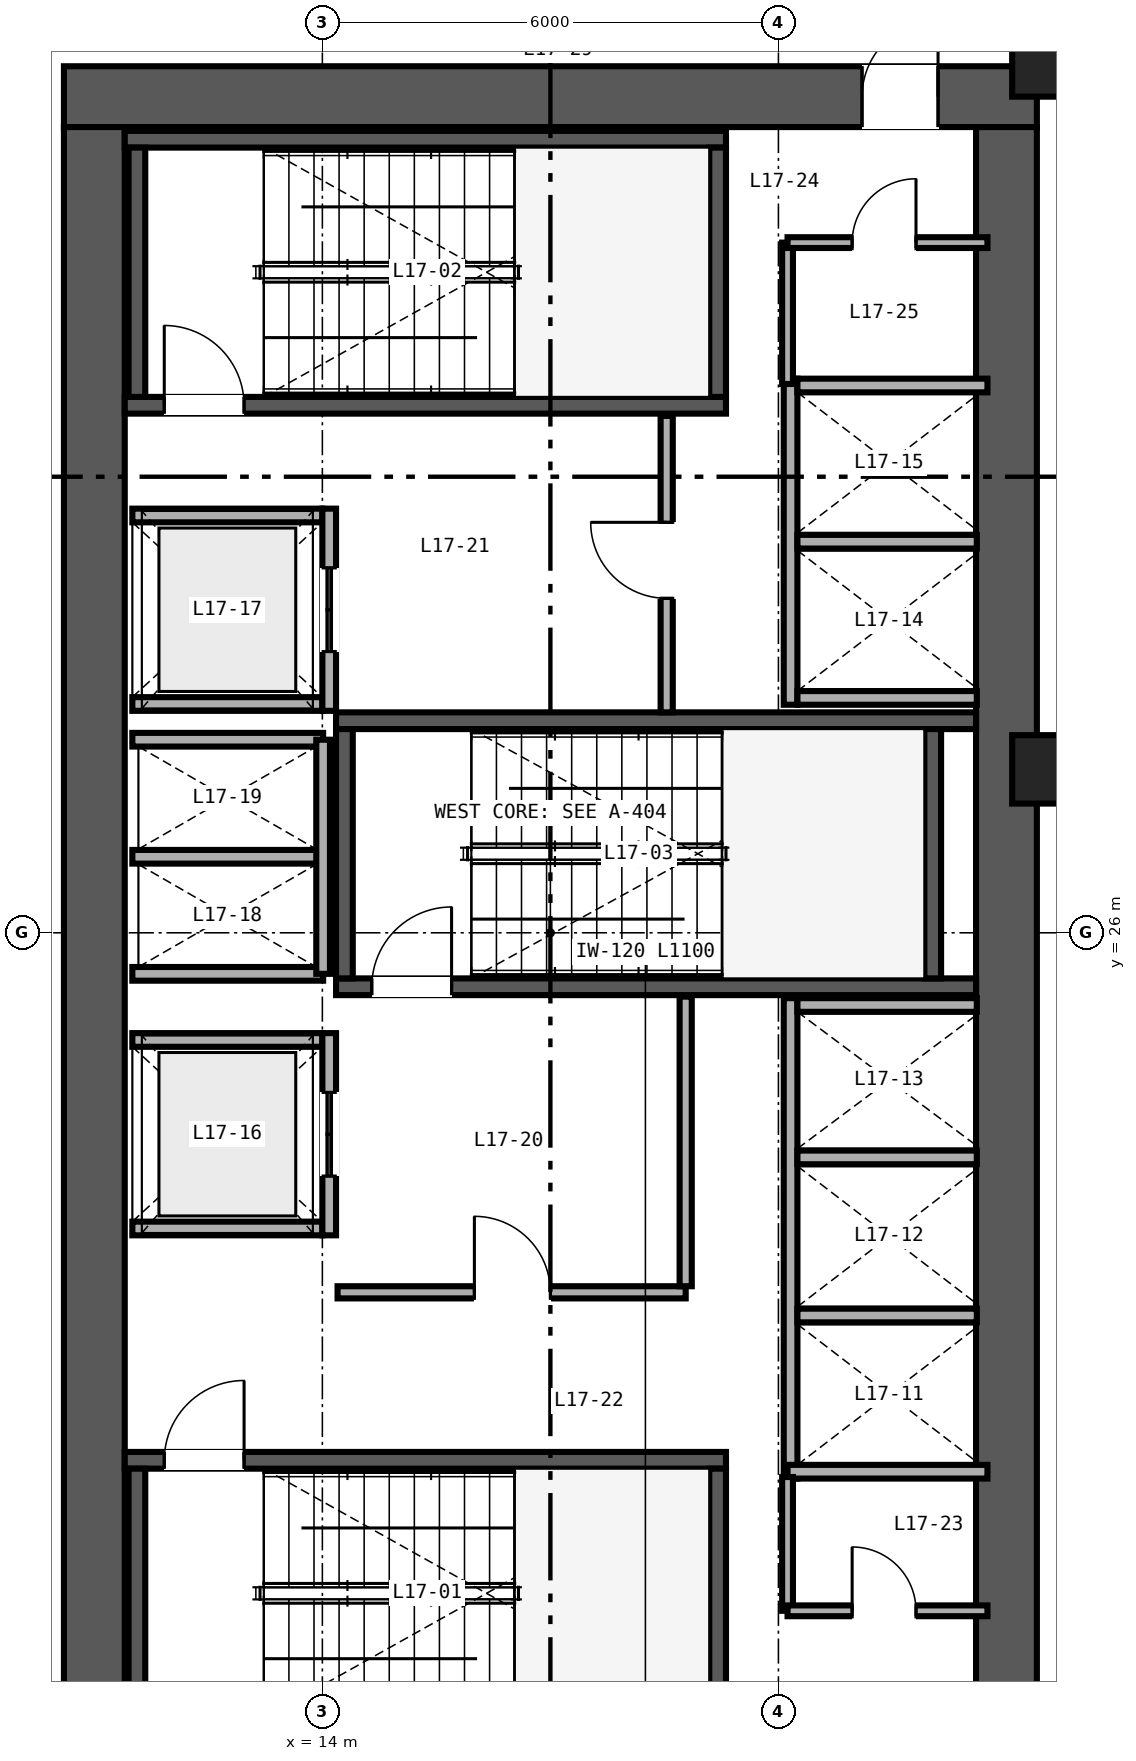
"""IFC4 building model, lengths in metres.
Left out: names, types, materials, properties, quantities, classifications, styles, units other than length and angle.
Written with IfcOpenShell. Run it as: python <this file> out.ifc"""

import sys

from ifc_helpers import new_model, si_unit, direction, frame, frame_2d, origin, origin_2d, place, context, subcontext, project, spatial, rectangle, hollow_rectangle, extrude, source, transform, mapped, element, fill, save


model = new_model("IFC4")
c1 = context("Model", 3, precision=1e-05, world=origin(), true_north=direction((0.0, 1.0)))
c2 = subcontext(c1, "Body", "Model", "MODEL_VIEW")
j1 = project(units=[si_unit("LENGTHUNIT", "METRE"), si_unit("PLANEANGLEUNIT", "RADIAN")], contexts=[c1])
p1 = place(None, origin())
s1 = spatial("IfcSite", under=j1, at=p1, CompositionType="ELEMENT")
p2 = place(p1, origin())
s2 = spatial("IfcBuilding", under=s1, at=p2, CompositionType="ELEMENT")
p3 = place(p2, frame((0.0, 0.0, 70.8)))
s3 = spatial("IfcBuildingStorey", under=s2, at=p3, CompositionType="ELEMENT", Elevation=70.8)
p4 = place(p3, frame((10.6, 37.0, 0.0), z_axis=(0.0, 0.0, 1.0), x_axis=(1.0, 0.0, 0.0)))
e1 = element("IfcWall", 1, at=p4, inside=s3, PredefinedType="SHEAR", context=c2, shape_type="SweptSolid", body=[
    extrude(rectangle(XDim=12.8, YDim=0.8, at=frame_2d((6.4, 0.0))), origin(), (0.0, 0.0, 1.0), 3.35),
])
p5 = place(p4, frame((10.5, 0.0, 0.0)))
e2 = element("IfcOpeningElement", 2, at=p5, cuts=e1, PredefinedType="OPENING", context=c2, shape_type="SweptSolid", body=[
    extrude(rectangle(XDim=1.0, YDim=2.15, at=frame_2d((0.5, 1.075))), frame((0.0, 0.41, 0.0), z_axis=(0.0, -1.0, 0.0), x_axis=(1.0, 0.0, 0.0)), (0.0, 0.0, 1.0), 0.82),
])
for number, where, z_axis, x_axis in (
    (3, (11.0, 15.4, 0.0), (0.0, 0.0, 1.0), (0.0, 1.0, 0.0)),
    (4, (23.0, 15.4, 0.0), (0.0, 0.0, 1.0), (0.0, 1.0, 0.0)),
):
    element("IfcWall", number, at=place(p3, frame(where, z_axis=z_axis, x_axis=x_axis)), inside=s3, PredefinedType="SHEAR", context=c2, shape_type="SweptSolid", body=[
        extrude(rectangle(XDim=21.2, YDim=0.8, at=frame_2d((10.6, 0.0))), origin(), (0.0, 0.0, 1.0), 3.35),
    ])
p6 = place(p3, frame((11.4, 19.06, 0.0), z_axis=(0.0, 0.0, 1.0), x_axis=(1.0, 0.0, 0.0)))
e5 = element("IfcWall", 5, at=p6, inside=s3, PredefinedType="SHEAR", context=c2, shape_type="SweptSolid", body=[
    extrude(rectangle(XDim=7.91, YDim=0.22, at=frame_2d((3.955, 0.0))), origin(), (0.0, 0.0, 1.0), 3.4),
])
p7 = place(p6, frame((0.52, 0.0, 0.0)))
e6 = element("IfcOpeningElement", 6, at=p7, cuts=e5, PredefinedType="OPENING", context=c2, shape_type="SweptSolid", body=[
    extrude(rectangle(XDim=1.05, YDim=2.15, at=frame_2d((0.525, 1.075))), frame((0.0, 0.12, 0.0), z_axis=(0.0, -1.0, 0.0), x_axis=(1.0, 0.0, 0.0)), (0.0, 0.0, 1.0), 0.24),
])
for number, where, z_axis, x_axis in (
    (7, (11.56, 15.67, 0.0), (0.0, 0.0, 1.0), (0.0, 1.0, 0.0)),
    (8, (19.2, 15.67, 0.0), (0.0, 0.0, 1.0), (0.0, 1.0, 0.0)),
):
    element("IfcWall", number, at=place(p3, frame(where, z_axis=z_axis, x_axis=x_axis)), inside=s3, PredefinedType="SHEAR", context=c2, shape_type="SweptSolid", body=[
        extrude(rectangle(XDim=3.28, YDim=0.22, at=frame_2d((1.64, 0.0))), origin(), (0.0, 0.0, 1.0), 3.4),
    ])
p8 = place(p3, frame((11.4, 32.94, 0.0), z_axis=(0.0, 0.0, 1.0), x_axis=(1.0, 0.0, 0.0)))
e9 = element("IfcWall", 9, at=p8, inside=s3, PredefinedType="SHEAR", context=c2, shape_type="SweptSolid", body=[
    extrude(rectangle(XDim=7.91, YDim=0.22, at=frame_2d((3.955, 0.0))), origin(), (0.0, 0.0, 1.0), 3.4),
])
p9 = place(p8, frame((0.52, 0.0, 0.0)))
e10 = element("IfcOpeningElement", 10, at=p9, cuts=e9, PredefinedType="OPENING", context=c2, shape_type="SweptSolid", body=[
    extrude(rectangle(XDim=1.05, YDim=2.15, at=frame_2d((0.525, 1.075))), frame((0.0, 0.12, 0.0), z_axis=(0.0, -1.0, 0.0), x_axis=(1.0, 0.0, 0.0)), (0.0, 0.0, 1.0), 0.24),
])
p10 = place(p3, frame((11.4, 36.44, 0.0), z_axis=(0.0, 0.0, 1.0), x_axis=(1.0, 0.0, 0.0)))
e11 = element("IfcWall", 11, at=p10, inside=s3, PredefinedType="SHEAR", context=c2, shape_type="SweptSolid", body=[
    extrude(rectangle(XDim=7.91, YDim=0.22, at=frame_2d((3.955, 0.0))), origin(), (0.0, 0.0, 1.0), 3.4),
])
for number, where, z_axis, x_axis in (
    (12, (11.56, 33.05, 0.0), (0.0, 0.0, 1.0), (0.0, 1.0, 0.0)),
    (13, (19.2, 33.05, 0.0), (0.0, 0.0, 1.0), (0.0, 1.0, 0.0)),
):
    element("IfcWall", number, at=place(p3, frame(where, z_axis=z_axis, x_axis=x_axis)), inside=s3, PredefinedType="SHEAR", context=c2, shape_type="SweptSolid", body=[
        extrude(rectangle(XDim=3.28, YDim=0.22, at=frame_2d((1.64, 0.0))), origin(), (0.0, 0.0, 1.0), 3.4),
    ])
p11 = place(p3, frame((14.18, 25.29, 0.0), z_axis=(0.0, 0.0, 1.0), x_axis=(1.0, 0.0, 0.0)))
e14 = element("IfcWall", 14, at=p11, inside=s3, PredefinedType="SHEAR", context=c2, shape_type="SweptSolid", body=[
    extrude(rectangle(XDim=8.42, YDim=0.22, at=frame_2d((4.21, 0.0))), origin(), (0.0, 0.0, 1.0), 3.4),
])
p12 = place(p11, frame((0.47, 0.0, 0.0)))
e15 = element("IfcOpeningElement", 15, at=p12, cuts=e14, PredefinedType="OPENING", context=c2, shape_type="SweptSolid", body=[
    extrude(rectangle(XDim=1.05, YDim=2.15, at=frame_2d((0.525, 1.075))), frame((0.0, 0.12, 0.0), z_axis=(0.0, -1.0, 0.0), x_axis=(1.0, 0.0, 0.0)), (0.0, 0.0, 1.0), 0.24),
])
p13 = place(p3, frame((14.18, 28.79, 0.0), z_axis=(0.0, 0.0, 1.0), x_axis=(1.0, 0.0, 0.0)))
e16 = element("IfcWall", 16, at=p13, inside=s3, PredefinedType="SHEAR", context=c2, shape_type="SweptSolid", body=[
    extrude(rectangle(XDim=8.42, YDim=0.22, at=frame_2d((4.21, 0.0))), origin(), (0.0, 0.0, 1.0), 3.4),
])
for number, where, z_axis, x_axis in (
    (17, (14.29, 25.4, 0.0), (0.0, 0.0, 1.0), (0.0, 1.0, 0.0)),
    (18, (22.03, 25.4, 0.0), (0.0, 0.0, 1.0), (0.0, 1.0, 0.0)),
):
    element("IfcWall", number, at=place(p3, frame(where, z_axis=z_axis, x_axis=x_axis)), inside=s3, PredefinedType="SHEAR", context=c2, shape_type="SweptSolid", body=[
        extrude(rectangle(XDim=3.28, YDim=0.22, at=frame_2d((1.64, 0.0))), origin(), (0.0, 0.0, 1.0), 3.4),
    ])
m1 = source(origin(), c2, "Body", "SweptSolid", [
    extrude(hollow_rectangle(XDim=0.85, YDim=0.9, WallThickness=0.04, at=origin_2d()), origin(), (0.0, 0.0, 1.0), 3.35),
])
for number, where, z_axis, x_axis in (
    (19, (23.5, 28.15, 0.0), (0.0, 0.0, 1.0), (1.0, 0.0, 0.0)),
    (20, (23.5, 37.45, 0.0), (0.0, 0.0, 1.0), (1.0, 0.0, 0.0)),
):
    element("IfcColumn", number, at=place(p3, frame(where, z_axis=z_axis, x_axis=x_axis)), inside=s3, PredefinedType="COLUMN", context=c2, shape_type="MappedRepresentation", body=[
        mapped(m1, transform((0.0, 0.0, 0.0), scale=1.0)),
    ])
p14 = place(p3, frame((20.16, 18.82, 0.0), z_axis=(0.0, 0.0, 1.0), x_axis=(0.0, 1.0, 0.0)))
e21 = element("IfcWall", 21, at=p14, inside=s3, PredefinedType="SOLIDWALL", context=c2, shape_type="SweptSolid", body=[
    extrude(rectangle(XDim=6.32, YDim=0.18, at=frame_2d((3.16, 0.0))), origin(), (0.0, 0.0, 1.0), 2.36),
])
p15 = place(p3, frame((20.12, 18.91, 0.0), z_axis=(0.0, 0.0, 1.0), x_axis=(1.0, 0.0, 0.0)))
e22 = element("IfcWall", 22, at=p15, inside=s3, PredefinedType="SOLIDWALL", context=c2, shape_type="SweptSolid", body=[
    extrude(rectangle(XDim=2.63, YDim=0.18, at=frame_2d((1.315, 0.0))), origin(), (0.0, 0.0, 1.0), 3.35),
])
p16 = place(p3, frame((20.25, 25.05, 0.0), z_axis=(0.0, 0.0, 1.0), x_axis=(1.0, 0.0, 0.0)))
e23 = element("IfcWall", 23, at=p16, inside=s3, PredefinedType="SOLIDWALL", context=c2, shape_type="SweptSolid", body=[
    extrude(rectangle(XDim=2.36, YDim=0.18, at=frame_2d((1.18, 0.0))), origin(), (0.0, 0.0, 1.0), 3.35),
])
p17 = place(p3, frame((20.25, 20.965, 0.0), z_axis=(0.0, 0.0, 1.0), x_axis=(1.0, 0.0, 0.0)))
e24 = element("IfcWall", 24, at=p17, inside=s3, PredefinedType="SOLIDWALL", context=c2, shape_type="SweptSolid", body=[
    extrude(rectangle(XDim=2.36, YDim=0.18, at=frame_2d((1.18, 0.0))), origin(), (0.0, 0.0, 1.0), 2.36),
])
p18 = place(p3, frame((20.25, 23.045, 0.0), z_axis=(0.0, 0.0, 1.0), x_axis=(1.0, 0.0, 0.0)))
e25 = element("IfcWall", 25, at=p18, inside=s3, PredefinedType="SOLIDWALL", context=c2, shape_type="SweptSolid", body=[
    extrude(rectangle(XDim=2.36, YDim=0.18, at=frame_2d((1.18, 0.0))), origin(), (0.0, 0.0, 1.0), 3.35),
])
p19 = place(p3, frame((20.16, 29.0, 0.0), z_axis=(0.0, 0.0, 1.0), x_axis=(0.0, 1.0, 0.0)))
e26 = element("IfcWall", 26, at=p19, inside=s3, PredefinedType="SOLIDWALL", context=c2, shape_type="SweptSolid", body=[
    extrude(rectangle(XDim=4.29, YDim=0.18, at=frame_2d((2.145, 0.0))), origin(), (0.0, 0.0, 1.0), 3.35),
])
p20 = place(p3, frame((20.25, 29.09, 0.0), z_axis=(0.0, 0.0, 1.0), x_axis=(1.0, 0.0, 0.0)))
e27 = element("IfcWall", 27, at=p20, inside=s3, PredefinedType="SOLIDWALL", context=c2, shape_type="SweptSolid", body=[
    extrude(rectangle(XDim=2.36, YDim=0.18, at=frame_2d((1.18, 0.0))), origin(), (0.0, 0.0, 1.0), 3.35),
])
p21 = place(p3, frame((20.25, 33.2, 0.0), z_axis=(0.0, 0.0, 1.0), x_axis=(1.0, 0.0, 0.0)))
e28 = element("IfcWall", 28, at=p21, inside=s3, PredefinedType="SOLIDWALL", context=c2, shape_type="SweptSolid", body=[
    extrude(rectangle(XDim=2.5, YDim=0.18, at=frame_2d((1.25, 0.0))), origin(), (0.0, 0.0, 1.0), 3.35),
])
p22 = place(p3, frame((20.25, 31.145, 0.0), z_axis=(0.0, 0.0, 1.0), x_axis=(1.0, 0.0, 0.0)))
e29 = element("IfcWall", 29, at=p22, inside=s3, PredefinedType="SOLIDWALL", context=c2, shape_type="SweptSolid", body=[
    extrude(rectangle(XDim=2.36, YDim=0.18, at=frame_2d((1.18, 0.0))), origin(), (0.0, 0.0, 1.0), 3.35),
])
for number, where, z_axis, x_axis in (
    (30, (11.5, 22.11, 0.0), (0.0, 0.0, 1.0), (1.0, 0.0, 0.0)),
    (31, (11.5, 24.59, 0.0), (0.0, 0.0, 1.0), (1.0, 0.0, 0.0)),
):
    element("IfcWall", number, at=place(p3, frame(where, z_axis=z_axis, x_axis=x_axis)), inside=s3, PredefinedType="SOLIDWALL", context=c2, shape_type="SweptSolid", body=[
        extrude(rectangle(XDim=2.5, YDim=0.18, at=frame_2d((1.25, 0.0))), origin(), (0.0, 0.0, 1.0), 3.35),
    ])
p23 = place(p3, frame((14.09, 22.02, 0.0), z_axis=(0.0, 0.0, 1.0), x_axis=(0.0, 1.0, 0.0)))
e32 = element("IfcWall", 32, at=p23, inside=s3, PredefinedType="SOLIDWALL", context=c2, shape_type="SweptSolid", body=[
    extrude(rectangle(XDim=2.66, YDim=0.18, at=frame_2d((1.33, 0.0))), origin(), (0.0, 0.0, 1.0), 3.35),
])
p24 = place(p23, frame((0.78, 0.0, 0.0)))
e33 = element("IfcOpeningElement", 33, at=p24, cuts=e32, PredefinedType="OPENING", context=c2, shape_type="SweptSolid", body=[
    extrude(rectangle(XDim=1.1, YDim=2.2, at=frame_2d((0.55, 1.1))), frame((0.0, 0.1, 0.0), z_axis=(0.0, -1.0, 0.0), x_axis=(1.0, 0.0, 0.0)), (0.0, 0.0, 1.0), 0.2),
])
for number, where, z_axis, x_axis in (
    (34, (11.5, 29.01, 0.0), (0.0, 0.0, 1.0), (1.0, 0.0, 0.0)),
    (35, (11.5, 31.49, 0.0), (0.0, 0.0, 1.0), (1.0, 0.0, 0.0)),
):
    element("IfcWall", number, at=place(p3, frame(where, z_axis=z_axis, x_axis=x_axis)), inside=s3, PredefinedType="SOLIDWALL", context=c2, shape_type="SweptSolid", body=[
        extrude(rectangle(XDim=2.5, YDim=0.18, at=frame_2d((1.25, 0.0))), origin(), (0.0, 0.0, 1.0), 3.35),
    ])
p25 = place(p3, frame((14.09, 28.92, 0.0), z_axis=(0.0, 0.0, 1.0), x_axis=(0.0, 1.0, 0.0)))
e36 = element("IfcWall", 36, at=p25, inside=s3, PredefinedType="SOLIDWALL", context=c2, shape_type="SweptSolid", body=[
    extrude(rectangle(XDim=2.66, YDim=0.18, at=frame_2d((1.33, 0.0))), origin(), (0.0, 0.0, 1.0), 3.35),
])
p26 = place(p25, frame((0.78, 0.0, 0.0)))
e37 = element("IfcOpeningElement", 37, at=p26, cuts=e36, PredefinedType="OPENING", context=c2, shape_type="SweptSolid", body=[
    extrude(rectangle(XDim=1.1, YDim=2.2, at=frame_2d((0.55, 1.1))), frame((0.0, 0.1, 0.0), z_axis=(0.0, -1.0, 0.0), x_axis=(1.0, 0.0, 0.0)), (0.0, 0.0, 1.0), 0.2),
])
for number, where, z_axis, x_axis in (
    (38, (11.5, 25.46, 0.0), (0.0, 0.0, 1.0), (1.0, 0.0, 0.0)),
    (39, (11.5, 27.0, 0.0), (0.0, 0.0, 1.0), (1.0, 0.0, 0.0)),
    (40, (11.5, 28.54, 0.0), (0.0, 0.0, 1.0), (1.0, 0.0, 0.0)),
):
    element("IfcWall", number, at=place(p3, frame(where, z_axis=z_axis, x_axis=x_axis)), inside=s3, PredefinedType="SOLIDWALL", context=c2, shape_type="SweptSolid", body=[
        extrude(rectangle(XDim=2.51, YDim=0.18, at=frame_2d((1.255, 0.0))), origin(), (0.0, 0.0, 1.0), 3.35),
    ])
p27 = place(p3, frame((14.01, 25.46, 0.0), z_axis=(0.0, 0.0, 1.0), x_axis=(0.0, 1.0, 0.0)))
e41 = element("IfcWall", 41, at=p27, inside=s3, PredefinedType="SOLIDWALL", context=c2, shape_type="SweptSolid", body=[
    extrude(rectangle(XDim=3.08, YDim=0.18, at=frame_2d((1.54, 0.0))), origin(), (0.0, 0.0, 1.0), 3.35),
])
p28 = place(p3, frame((14.2, 21.27, 0.0), z_axis=(0.0, 0.0, 1.0), x_axis=(1.0, 0.0, 0.0)))
e42 = element("IfcWall", 42, at=p28, inside=s3, PredefinedType="PARTITIONING", context=c2, shape_type="SweptSolid", body=[
    extrude(rectangle(XDim=4.58, YDim=0.16, at=frame_2d((2.29, 0.0))), origin(), (0.0, 0.0, 1.0), 3.35),
])
p29 = place(p28, frame((1.8, 0.0, 0.0)))
e43 = element("IfcOpeningElement", 43, at=p29, cuts=e42, PredefinedType="OPENING", context=c2, shape_type="SweptSolid", body=[
    extrude(rectangle(XDim=1.0, YDim=2.15, at=frame_2d((0.5, 1.075))), frame((0.0, 0.09, 0.0), z_axis=(0.0, -1.0, 0.0), x_axis=(1.0, 0.0, 0.0)), (0.0, 0.0, 1.0), 0.18),
])
p30 = place(p3, frame((18.78, 21.35, 0.0), z_axis=(0.0, 0.0, 1.0), x_axis=(0.0, 1.0, 0.0)))
e44 = element("IfcWall", 44, at=p30, inside=s3, PredefinedType="PARTITIONING", context=c2, shape_type="SweptSolid", body=[
    extrude(rectangle(XDim=3.81, YDim=0.16, at=frame_2d((1.905, 0.0))), origin(), (0.0, 0.0, 1.0), 3.35),
])
p31 = place(p3, frame((18.53, 28.9, 0.0), z_axis=(0.0, 0.0, 1.0), x_axis=(0.0, 1.0, 0.0)))
e45 = element("IfcWall", 45, at=p31, inside=s3, PredefinedType="PARTITIONING", context=c2, shape_type="SweptSolid", body=[
    extrude(rectangle(XDim=3.9, YDim=0.16, at=frame_2d((1.95, 0.0))), origin(), (0.0, 0.0, 1.0), 3.35),
])
p32 = place(p31, frame((1.5, 0.0, 0.0)))
e46 = element("IfcOpeningElement", 46, at=p32, cuts=e45, PredefinedType="OPENING", context=c2, shape_type="SweptSolid", body=[
    extrude(rectangle(XDim=1.0, YDim=2.15, at=frame_2d((0.5, 1.075))), frame((0.0, 0.09, 0.0), z_axis=(0.0, -1.0, 0.0), x_axis=(1.0, 0.0, 0.0)), (0.0, 0.0, 1.0), 0.18),
])
p33 = place(p3, frame((20.12, 17.08, 0.0), z_axis=(0.0, 0.0, 1.0), x_axis=(0.0, 1.0, 0.0)))
e47 = element("IfcWall", 47, at=p33, inside=s3, PredefinedType="PARTITIONING", context=c2, shape_type="SweptSolid", body=[
    extrude(rectangle(XDim=1.76, YDim=0.142, at=frame_2d((0.88, 0.0))), origin(), (0.0, 0.0, 1.0), 3.35),
])
p34 = place(p3, frame((20.12, 17.08, 0.0), z_axis=(0.0, 0.0, 1.0), x_axis=(1.0, 0.0, 0.0)))
e48 = element("IfcWall", 48, at=p34, inside=s3, PredefinedType="PARTITIONING", context=c2, shape_type="SweptSolid", body=[
    extrude(rectangle(XDim=2.63, YDim=0.142, at=frame_2d((1.315, 0.0))), origin(), (0.0, 0.0, 1.0), 3.35),
])
p35 = place(p34, frame((0.85, 0.0, 0.0)))
e49 = element("IfcOpeningElement", 49, at=p35, cuts=e48, PredefinedType="OPENING", context=c2, shape_type="SweptSolid", body=[
    extrude(rectangle(XDim=0.84, YDim=2.1, at=frame_2d((0.42, 1.05))), frame((0.0, 0.081, 0.0), z_axis=(0.0, -1.0, 0.0), x_axis=(1.0, 0.0, 0.0)), (0.0, 0.0, 1.0), 0.162),
])
p36 = place(p3, frame((20.12, 33.22, 0.0), z_axis=(0.0, 0.0, 1.0), x_axis=(0.0, 1.0, 0.0)))
e50 = element("IfcWall", 50, at=p36, inside=s3, PredefinedType="PARTITIONING", context=c2, shape_type="SweptSolid", body=[
    extrude(rectangle(XDim=1.86, YDim=0.142, at=frame_2d((0.93, 0.0))), origin(), (0.0, 0.0, 1.0), 3.35),
])
p37 = place(p3, frame((20.12, 35.08, 0.0), z_axis=(0.0, 0.0, 1.0), x_axis=(1.0, 0.0, 0.0)))
e51 = element("IfcWall", 51, at=p37, inside=s3, PredefinedType="PARTITIONING", context=c2, shape_type="SweptSolid", body=[
    extrude(rectangle(XDim=2.63, YDim=0.142, at=frame_2d((1.315, 0.0))), origin(), (0.0, 0.0, 1.0), 3.35),
])
p38 = place(p37, frame((0.85, 0.0, 0.0)))
e52 = element("IfcOpeningElement", 52, at=p38, cuts=e51, PredefinedType="OPENING", context=c2, shape_type="SweptSolid", body=[
    extrude(rectangle(XDim=0.84, YDim=2.1, at=frame_2d((0.42, 1.05))), frame((0.0, 0.081, 0.0), z_axis=(0.0, -1.0, 0.0), x_axis=(1.0, 0.0, 0.0)), (0.0, 0.0, 1.0), 0.162),
])
m2 = source(origin(), c2, "Body", "SweptSolid", [
    extrude(rectangle(XDim=1.05, YDim=2.15, at=frame_2d((0.525, 1.075))), frame((0.0, 0.025, 0.0), z_axis=(0.0, -1.0, 0.0), x_axis=(1.0, 0.0, 0.0)), (0.0, 0.0, 1.0), 0.05),
])
p39 = place(p7, origin())
e53 = element("IfcDoor", 53, at=p39, inside=s3, OperationType="SINGLE_SWING_RIGHT", PredefinedType="DOOR", context=c2, shape_type="MappedRepresentation", body=[
    mapped(m2, transform((0.0, 0.0, 0.0), scale=1.0)),
])
fill(e6, e53)
p40 = place(p9, origin())
e54 = element("IfcDoor", 54, at=p40, inside=s3, OperationType="SINGLE_SWING_LEFT", PredefinedType="DOOR", context=c2, shape_type="MappedRepresentation", body=[
    mapped(m2, transform((0.0, 0.0, 0.0), scale=1.0)),
])
fill(e10, e54)
p41 = place(p12, origin())
e55 = element("IfcDoor", 55, at=p41, inside=s3, OperationType="SINGLE_SWING_RIGHT", PredefinedType="DOOR", context=c2, shape_type="MappedRepresentation", body=[
    mapped(m2, transform((0.0, 0.0, 0.0), scale=1.0)),
])
fill(e15, e55)
m3 = source(origin(), c2, "Body", "SweptSolid", [
    extrude(rectangle(XDim=1.1, YDim=2.2, at=frame_2d((0.55, 1.1))), frame((0.0, 0.025, 0.0), z_axis=(0.0, -1.0, 0.0), x_axis=(1.0, 0.0, 0.0)), (0.0, 0.0, 1.0), 0.05),
])
p42 = place(p24, origin())
e56 = element("IfcDoor", 56, at=p42, inside=s3, OperationType="DOUBLE_DOOR_SLIDING", PredefinedType="DOOR", context=c2, shape_type="MappedRepresentation", body=[
    mapped(m3, transform((0.0, 0.0, 0.0), scale=1.0)),
])
fill(e33, e56)
p43 = place(p26, origin())
e57 = element("IfcDoor", 57, at=p43, inside=s3, OperationType="DOUBLE_DOOR_SLIDING", PredefinedType="DOOR", context=c2, shape_type="MappedRepresentation", body=[
    mapped(m3, transform((0.0, 0.0, 0.0), scale=1.0)),
])
fill(e37, e57)
m4 = source(origin(), c2, "Body", "SweptSolid", [
    extrude(rectangle(XDim=1.0, YDim=2.15, at=frame_2d((0.5, 1.075))), frame((0.0, 0.025, 0.0), z_axis=(0.0, -1.0, 0.0), x_axis=(1.0, 0.0, 0.0)), (0.0, 0.0, 1.0), 0.05),
])
p44 = place(p29, origin())
e58 = element("IfcDoor", 58, at=p44, inside=s3, OperationType="SINGLE_SWING_LEFT", PredefinedType="DOOR", context=c2, shape_type="MappedRepresentation", body=[
    mapped(m4, transform((0.0, 0.0, 0.0), scale=1.0)),
])
fill(e43, e58)
p45 = place(p32, origin())
e59 = element("IfcDoor", 59, at=p45, inside=s3, OperationType="SINGLE_SWING_RIGHT", PredefinedType="DOOR", context=c2, shape_type="MappedRepresentation", body=[
    mapped(m4, transform((0.0, 0.0, 0.0), scale=1.0)),
])
fill(e46, e59)
m5 = source(origin(), c2, "Body", "SweptSolid", [
    extrude(rectangle(XDim=0.84, YDim=2.1, at=frame_2d((0.42, 1.05))), frame((0.0, 0.025, 0.0), z_axis=(0.0, -1.0, 0.0), x_axis=(1.0, 0.0, 0.0)), (0.0, 0.0, 1.0), 0.05),
])
p46 = place(p35, origin())
e60 = element("IfcDoor", 60, at=p46, inside=s3, OperationType="SINGLE_SWING_LEFT", PredefinedType="DOOR", context=c2, shape_type="MappedRepresentation", body=[
    mapped(m5, transform((0.0, 0.0, 0.0), scale=1.0)),
])
fill(e49, e60)
p47 = place(p38, origin())
e61 = element("IfcDoor", 61, at=p47, inside=s3, OperationType="SINGLE_SWING_RIGHT", PredefinedType="DOOR", context=c2, shape_type="MappedRepresentation", body=[
    mapped(m5, transform((0.0, 0.0, 0.0), scale=1.0)),
])
fill(e52, e61)
p48 = place(p5, origin())
e62 = element("IfcDoor", 62, at=p48, inside=s3, OperationType="SINGLE_SWING_RIGHT", PredefinedType="DOOR", context=c2, shape_type="MappedRepresentation", body=[
    mapped(m4, transform((0.0, 0.0, 0.0), scale=1.0)),
])
fill(e2, e62)
save(model, sys.argv[1])
